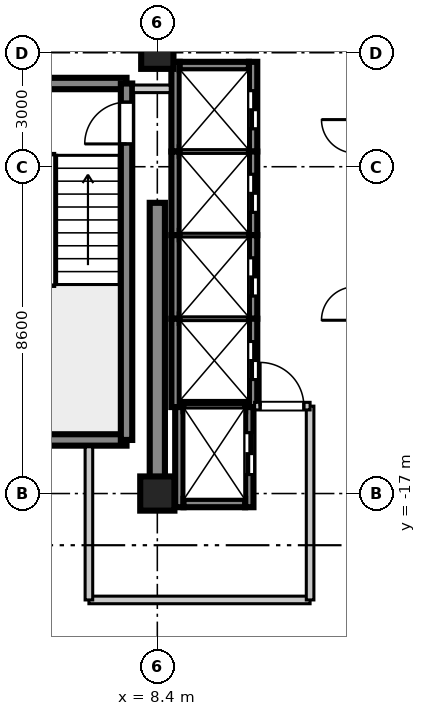
"""IFC4 building model, lengths in metres.
Left out: names, types, materials, properties, quantities, classifications, styles, units other than length and angle.
Written with IfcOpenShell. Run it as: python <this file> out.ifc"""

import sys

from ifc_helpers import new_model, si_unit, direction, frame, frame_2d, origin, origin_2d, place, context, subcontext, project, spatial, rectangle, extrude, source, transform, mapped, element, fill, save


model = new_model("IFC4")
c1 = context("Model", 3, precision=1e-05, world=origin(), true_north=direction((0.0, 1.0)))
c2 = subcontext(c1, "Body", "Model", "MODEL_VIEW")
j1 = project(units=[si_unit("LENGTHUNIT", "METRE"), si_unit("PLANEANGLEUNIT", "RADIAN")], contexts=[c1])
p1 = place(None, origin())
s1 = spatial("IfcSite", under=j1, at=p1, CompositionType="ELEMENT")
p2 = place(p1, origin())
s2 = spatial("IfcBuilding", under=s1, at=p2, CompositionType="ELEMENT")
p3 = place(p2, frame((0.0, 0.0, 281.3)))
s3 = spatial("IfcBuildingStorey", under=s2, at=p3, CompositionType="ELEMENT", Elevation=281.3)
m1 = source(origin(), c2, "Body", "SweptSolid", [
    extrude(rectangle(XDim=0.9, YDim=0.9, at=origin_2d()), origin(), (0.0, 0.0, 1.0), 3.705),
])
p4 = place(p3, frame((8.4, -17.0, 0.0), z_axis=(0.0, 0.0, 1.0), x_axis=(1.0, 0.0, 0.0)))
e1 = element("IfcColumn", 1, at=p4, inside=s3, PredefinedType="COLUMN", context=c2, shape_type="MappedRepresentation", body=[
    mapped(m1, transform((0.0, 0.0, 0.0), scale=1.0)),
])
m2 = source(origin(), c2, "Body", "SweptSolid", [
    extrude(rectangle(XDim=0.85, YDim=0.85, at=origin_2d()), origin(), (0.0, 0.0, 1.0), 3.705),
])
p5 = place(p3, frame((8.4, -5.4, 0.0), z_axis=(0.0, 0.0, 1.0), x_axis=(1.0, 0.0, 0.0)))
e2 = element("IfcColumn", 2, at=p5, inside=s3, PredefinedType="PILASTER", context=c2, shape_type="MappedRepresentation", body=[
    mapped(m2, transform((0.0, 0.0, 0.0), scale=1.0)),
])
m3 = source(origin(), c2, "Body", "SweptSolid", [
    extrude(rectangle(XDim=7.65, YDim=0.4, at=frame_2d((3.825, 0.0))), origin(), (0.0, 0.0, 1.0), 3.45),
])
p6 = place(p3, frame((8.4, -17.0, 0.0), z_axis=(0.0, 0.0, 1.0), x_axis=(0.0, 1.0, 0.0)))
e3 = element("IfcWall", 3, at=p6, inside=s3, PredefinedType="SHEAR", context=c2, shape_type="MappedRepresentation", body=[
    mapped(m3, transform((0.0, 0.0, 0.0), scale=1.0)),
])
m4 = source(origin(), c2, "Body", "SweptSolid", [
    extrude(rectangle(XDim=3.98, YDim=0.3, at=frame_2d((1.99, 0.0))), origin(), (0.0, 0.0, 1.0), 3.45),
])
for number, where, z_axis, x_axis in (
    (4, (3.61, -15.59, 0.0), (0.0, 0.0, 1.0), (1.0, 0.0, 0.0)),
    (5, (3.61, -6.21, 0.0), (0.0, 0.0, 1.0), (1.0, 0.0, 0.0)),
):
    element("IfcWall", number, at=place(p3, frame(where, z_axis=z_axis, x_axis=x_axis)), inside=s3, PredefinedType="SHEAR", context=c2, shape_type="MappedRepresentation", body=[
        mapped(m4, transform((0.0, 0.0, 0.0), scale=1.0)),
    ])
m5 = source(origin(), c2, "Body", "SweptSolid", [
    extrude(rectangle(XDim=9.38, YDim=0.3, at=frame_2d((4.69, 0.0))), origin(), (0.0, 0.0, 1.0), 3.45),
])
p7 = place(p3, frame((7.59, -15.59, 0.0), z_axis=(0.0, 0.0, 1.0), x_axis=(0.0, 1.0, 0.0)))
e6 = element("IfcWall", 6, at=p7, inside=s3, PredefinedType="SHEAR", context=c2, shape_type="MappedRepresentation", body=[
    mapped(m5, transform((0.0, 0.0, 0.0), scale=1.0)),
])
p8 = place(p7, frame((7.79, 0.0, 0.0)))
e7 = element("IfcOpeningElement", 7, at=p8, cuts=e6, PredefinedType="OPENING", context=c2, shape_type="SweptSolid", body=[
    extrude(rectangle(XDim=1.1, YDim=2.15, at=frame_2d((0.55, 1.075))), frame((0.0, 0.16, 0.0), z_axis=(0.0, -1.0, 0.0), x_axis=(1.0, 0.0, 0.0)), (0.0, 0.0, 1.0), 0.32),
])
m6 = source(origin(), c2, "Body", "SweptSolid", [
    extrude(rectangle(XDim=2.36, YDim=0.22, at=frame_2d((1.18, 0.0))), origin(), (0.0, 0.0, 1.0), 3.45),
])
p9 = place(p3, frame((8.88, -8.0, 0.0), z_axis=(0.0, 0.0, 1.0), x_axis=(0.0, 1.0, 0.0)))
e8 = element("IfcWall", 8, at=p9, inside=s3, PredefinedType="SHEAR", context=c2, shape_type="MappedRepresentation", body=[
    mapped(m6, transform((0.0, 0.0, 0.0), scale=1.0)),
])
p10 = place(p3, frame((10.92, -8.0, 0.0), z_axis=(0.0, 0.0, 1.0), x_axis=(0.0, 1.0, 0.0)))
e9 = element("IfcWall", 9, at=p10, inside=s3, PredefinedType="SHEAR", context=c2, shape_type="MappedRepresentation", body=[
    mapped(m6, transform((0.0, 0.0, 0.0), scale=1.0)),
])
p11 = place(p10, frame((0.6, 0.0, 0.0)))
e10 = element("IfcOpeningElement", 10, at=p11, cuts=e9, PredefinedType="OPENING", context=c2, shape_type="SweptSolid", body=[
    extrude(rectangle(XDim=1.0, YDim=2.2, at=frame_2d((0.5, 1.1))), frame((0.0, 0.12, 0.0), z_axis=(0.0, -1.0, 0.0), x_axis=(1.0, 0.0, 0.0)), (0.0, 0.0, 1.0), 0.24),
])
m7 = source(origin(), c2, "Body", "SweptSolid", [
    extrude(rectangle(XDim=1.82, YDim=0.22, at=frame_2d((0.91, 0.0))), origin(), (0.0, 0.0, 1.0), 3.45),
])
p12 = place(p3, frame((8.99, -5.75, 0.0), z_axis=(0.0, 0.0, 1.0), x_axis=(1.0, 0.0, 0.0)))
e11 = element("IfcWall", 11, at=p12, inside=s3, PredefinedType="SHEAR", context=c2, shape_type="MappedRepresentation", body=[
    mapped(m7, transform((0.0, 0.0, 0.0), scale=1.0)),
])
m8 = source(origin(), c2, "Body", "SweptSolid", [
    extrude(rectangle(XDim=2.2, YDim=0.22, at=frame_2d((1.1, 0.0))), origin(), (0.0, 0.0, 1.0), 3.45),
])
p13 = place(p3, frame((8.88, -10.2, 0.0), z_axis=(0.0, 0.0, 1.0), x_axis=(0.0, 1.0, 0.0)))
e12 = element("IfcWall", 12, at=p13, inside=s3, PredefinedType="SHEAR", context=c2, shape_type="MappedRepresentation", body=[
    mapped(m8, transform((0.0, 0.0, 0.0), scale=1.0)),
])
p14 = place(p3, frame((10.92, -10.2, 0.0), z_axis=(0.0, 0.0, 1.0), x_axis=(0.0, 1.0, 0.0)))
e13 = element("IfcWall", 13, at=p14, inside=s3, PredefinedType="SHEAR", context=c2, shape_type="MappedRepresentation", body=[
    mapped(m8, transform((0.0, 0.0, 0.0), scale=1.0)),
])
p15 = place(p14, frame((0.6, 0.0, 0.0)))
e14 = element("IfcOpeningElement", 14, at=p15, cuts=e13, PredefinedType="OPENING", context=c2, shape_type="SweptSolid", body=[
    extrude(rectangle(XDim=1.0, YDim=2.2, at=frame_2d((0.5, 1.1))), frame((0.0, 0.12, 0.0), z_axis=(0.0, -1.0, 0.0), x_axis=(1.0, 0.0, 0.0)), (0.0, 0.0, 1.0), 0.24),
])
m9 = source(origin(), c2, "Body", "SweptSolid", [
    extrude(rectangle(XDim=1.82, YDim=0.22, at=frame_2d((0.91, 0.0))), origin(), (0.0, 0.0, 1.0), 3.75),
])
p16 = place(p3, frame((8.99, -8.0, 0.0), z_axis=(0.0, 0.0, 1.0), x_axis=(1.0, 0.0, 0.0)))
e15 = element("IfcWall", 15, at=p16, inside=s3, PredefinedType="SHEAR", context=c2, shape_type="MappedRepresentation", body=[
    mapped(m9, transform((0.0, 0.0, 0.0), scale=1.0)),
])
p17 = place(p3, frame((8.88, -12.4, 0.0), z_axis=(0.0, 0.0, 1.0), x_axis=(0.0, 1.0, 0.0)))
e16 = element("IfcWall", 16, at=p17, inside=s3, PredefinedType="SHEAR", context=c2, shape_type="MappedRepresentation", body=[
    mapped(m8, transform((0.0, 0.0, 0.0), scale=1.0)),
])
p18 = place(p3, frame((10.92, -12.4, 0.0), z_axis=(0.0, 0.0, 1.0), x_axis=(0.0, 1.0, 0.0)))
e17 = element("IfcWall", 17, at=p18, inside=s3, PredefinedType="SHEAR", context=c2, shape_type="MappedRepresentation", body=[
    mapped(m8, transform((0.0, 0.0, 0.0), scale=1.0)),
])
p19 = place(p18, frame((0.6, 0.0, 0.0)))
e18 = element("IfcOpeningElement", 18, at=p19, cuts=e17, PredefinedType="OPENING", context=c2, shape_type="SweptSolid", body=[
    extrude(rectangle(XDim=1.0, YDim=2.2, at=frame_2d((0.5, 1.1))), frame((0.0, 0.12, 0.0), z_axis=(0.0, -1.0, 0.0), x_axis=(1.0, 0.0, 0.0)), (0.0, 0.0, 1.0), 0.24),
])
p20 = place(p3, frame((8.99, -10.2, 0.0), z_axis=(0.0, 0.0, 1.0), x_axis=(1.0, 0.0, 0.0)))
e19 = element("IfcWall", 19, at=p20, inside=s3, PredefinedType="SHEAR", context=c2, shape_type="MappedRepresentation", body=[
    mapped(m9, transform((0.0, 0.0, 0.0), scale=1.0)),
])
m10 = source(origin(), c2, "Body", "SweptSolid", [
    extrude(rectangle(XDim=2.325, YDim=0.22, at=frame_2d((1.163, 0.0))), origin(), (0.0, 0.0, 1.0), 3.45),
])
p21 = place(p3, frame((8.88, -14.725, 0.0), z_axis=(0.0, 0.0, 1.0), x_axis=(0.0, 1.0, 0.0)))
e20 = element("IfcWall", 20, at=p21, inside=s3, PredefinedType="SHEAR", context=c2, shape_type="MappedRepresentation", body=[
    mapped(m10, transform((0.0, 0.0, 0.0), scale=1.0)),
])
p22 = place(p3, frame((10.92, -14.725, 0.0), z_axis=(0.0, 0.0, 1.0), x_axis=(0.0, 1.0, 0.0)))
e21 = element("IfcWall", 21, at=p22, inside=s3, PredefinedType="SHEAR", context=c2, shape_type="MappedRepresentation", body=[
    mapped(m10, transform((0.0, 0.0, 0.0), scale=1.0)),
])
p23 = place(p22, frame((0.725, 0.0, 0.0)))
e22 = element("IfcOpeningElement", 22, at=p23, cuts=e21, PredefinedType="OPENING", context=c2, shape_type="SweptSolid", body=[
    extrude(rectangle(XDim=1.0, YDim=2.2, at=frame_2d((0.5, 1.1))), frame((0.0, 0.12, 0.0), z_axis=(0.0, -1.0, 0.0), x_axis=(1.0, 0.0, 0.0)), (0.0, 0.0, 1.0), 0.24),
])
p24 = place(p3, frame((8.99, -12.4, 0.0), z_axis=(0.0, 0.0, 1.0), x_axis=(1.0, 0.0, 0.0)))
e23 = element("IfcWall", 23, at=p24, inside=s3, PredefinedType="SHEAR", context=c2, shape_type="MappedRepresentation", body=[
    mapped(m9, transform((0.0, 0.0, 0.0), scale=1.0)),
])
m11 = source(origin(), c2, "Body", "SweptSolid", [
    extrude(rectangle(XDim=2.635, YDim=0.22, at=frame_2d((1.317, 0.0))), origin(), (0.0, 0.0, 1.0), 3.45),
])
p25 = place(p3, frame((8.98, -17.36, 0.0), z_axis=(0.0, 0.0, 1.0), x_axis=(0.0, 1.0, 0.0)))
e24 = element("IfcWall", 24, at=p25, inside=s3, PredefinedType="SHEAR", context=c2, shape_type="MappedRepresentation", body=[
    mapped(m11, transform((0.0, 0.0, 0.0), scale=1.0)),
])
p26 = place(p3, frame((10.82, -17.36, 0.0), z_axis=(0.0, 0.0, 1.0), x_axis=(0.0, 1.0, 0.0)))
e25 = element("IfcWall", 25, at=p26, inside=s3, PredefinedType="SHEAR", context=c2, shape_type="MappedRepresentation", body=[
    mapped(m11, transform((0.0, 0.0, 0.0), scale=1.0)),
])
p27 = place(p26, frame((0.86, 0.0, 0.0)))
e26 = element("IfcOpeningElement", 26, at=p27, cuts=e25, PredefinedType="OPENING", context=c2, shape_type="SweptSolid", body=[
    extrude(rectangle(XDim=1.1, YDim=2.2, at=frame_2d((0.55, 1.1))), frame((0.0, 0.12, 0.0), z_axis=(0.0, -1.0, 0.0), x_axis=(1.0, 0.0, 0.0)), (0.0, 0.0, 1.0), 0.24),
])
m12 = source(origin(), c2, "Body", "SweptSolid", [
    extrude(rectangle(XDim=1.62, YDim=0.22, at=frame_2d((0.81, 0.0))), origin(), (0.0, 0.0, 1.0), 3.45),
])
p28 = place(p3, frame((9.09, -17.25, 0.0), z_axis=(0.0, 0.0, 1.0), x_axis=(1.0, 0.0, 0.0)))
e27 = element("IfcWall", 27, at=p28, inside=s3, PredefinedType="SHEAR", context=c2, shape_type="MappedRepresentation", body=[
    mapped(m12, transform((0.0, 0.0, 0.0), scale=1.0)),
])
m13 = source(origin(), c2, "Body", "SweptSolid", [
    extrude(rectangle(XDim=1.62, YDim=0.22, at=frame_2d((0.81, 0.0))), origin(), (0.0, 0.0, 1.0), 3.75),
])
p29 = place(p3, frame((9.09, -14.725, 0.0), z_axis=(0.0, 0.0, 1.0), x_axis=(1.0, 0.0, 0.0)))
e28 = element("IfcWall", 28, at=p29, inside=s3, PredefinedType="SHEAR", context=c2, shape_type="MappedRepresentation", body=[
    mapped(m13, transform((0.0, 0.0, 0.0), scale=1.0)),
])
m14 = source(origin(), c2, "Body", "SweptSolid", [
    extrude(rectangle(XDim=5.82, YDim=0.2, at=frame_2d((2.91, 0.0))), origin(), (0.0, 0.0, 1.0), 2.79),
])
p30 = place(p3, frame((6.6, -19.8, 0.0), z_axis=(0.0, 0.0, 1.0), x_axis=(1.0, 0.0, 0.0)))
e29 = element("IfcWall", 29, at=p30, inside=s3, PredefinedType="PARTITIONING", context=c2, shape_type="MappedRepresentation", body=[
    mapped(m14, transform((0.0, 0.0, 0.0), scale=1.0)),
])
m15 = source(origin(), c2, "Body", "SweptSolid", [
    extrude(rectangle(XDim=4.03, YDim=0.2, at=frame_2d((2.015, 0.0))), origin(), (0.0, 0.0, 1.0), 2.79),
])
p31 = place(p3, frame((6.6, -19.8, 0.0), z_axis=(0.0, 0.0, 1.0), x_axis=(0.0, 1.0, 0.0)))
e30 = element("IfcWall", 30, at=p31, inside=s3, PredefinedType="PARTITIONING", context=c2, shape_type="MappedRepresentation", body=[
    mapped(m15, transform((0.0, 0.0, 0.0), scale=1.0)),
])
m16 = source(origin(), c2, "Body", "SweptSolid", [
    extrude(rectangle(XDim=5.1, YDim=0.2, at=frame_2d((2.55, 0.0))), origin(), (0.0, 0.0, 1.0), 2.79),
])
p32 = place(p3, frame((12.42, -19.8, 0.0), z_axis=(0.0, 0.0, 1.0), x_axis=(0.0, 1.0, 0.0)))
e31 = element("IfcWall", 31, at=p32, inside=s3, PredefinedType="PARTITIONING", context=c2, shape_type="MappedRepresentation", body=[
    mapped(m16, transform((0.0, 0.0, 0.0), scale=1.0)),
])
m17 = source(origin(), c2, "Body", "SweptSolid", [
    extrude(rectangle(XDim=1.46, YDim=0.2, at=frame_2d((0.73, 0.0))), origin(), (0.0, 0.0, 1.0), 2.79),
])
p33 = place(p3, frame((10.96, -14.7, 0.0), z_axis=(0.0, 0.0, 1.0), x_axis=(1.0, 0.0, 0.0)))
e32 = element("IfcWall", 32, at=p33, inside=s3, PredefinedType="PARTITIONING", context=c2, shape_type="MappedRepresentation", body=[
    mapped(m17, transform((0.0, 0.0, 0.0), scale=1.0)),
])
p34 = place(p33, frame((0.145, 0.0, 0.0)))
e33 = element("IfcOpeningElement", 33, at=p34, cuts=e32, PredefinedType="OPENING", context=c2, shape_type="SweptSolid", body=[
    extrude(rectangle(XDim=1.15, YDim=2.15, at=frame_2d((0.575, 1.075))), frame((0.0, 0.11, 0.0), z_axis=(0.0, -1.0, 0.0), x_axis=(1.0, 0.0, 0.0)), (0.0, 0.0, 1.0), 0.22),
])
m18 = source(origin(), c2, "Body", "SweptSolid", [
    extrude(rectangle(XDim=0.97, YDim=0.2, at=frame_2d((0.485, 0.0))), origin(), (0.0, 0.0, 1.0), 2.79),
])
p35 = place(p3, frame((7.77, -6.35, 0.0), z_axis=(0.0, 0.0, 1.0), x_axis=(1.0, 0.0, 0.0)))
e34 = element("IfcWall", 34, at=p35, inside=s3, PredefinedType="PARTITIONING", context=c2, shape_type="MappedRepresentation", body=[
    mapped(m18, transform((0.0, 0.0, 0.0), scale=1.0)),
])
m19 = source(origin(), c2, "Body", "SweptSolid", [
    extrude(rectangle(XDim=1.1, YDim=2.15, at=frame_2d((0.55, 1.075))), frame((0.0, 0.025, 0.0), z_axis=(0.0, -1.0, 0.0), x_axis=(1.0, 0.0, 0.0)), (0.0, 0.0, 1.0), 0.05),
])
p36 = place(p8, origin())
e35 = element("IfcDoor", 35, at=p36, inside=s3, OperationType="SINGLE_SWING_LEFT", PredefinedType="DOOR", context=c2, shape_type="MappedRepresentation", body=[
    mapped(m19, transform((0.0, 0.0, 0.0), scale=1.0)),
])
fill(e7, e35)
m20 = source(origin(), c2, "Body", "SweptSolid", [
    extrude(rectangle(XDim=1.0, YDim=2.2, at=frame_2d((0.5, 1.1))), frame((0.0, 0.025, 0.0), z_axis=(0.0, -1.0, 0.0), x_axis=(1.0, 0.0, 0.0)), (0.0, 0.0, 1.0), 0.05),
])
p37 = place(p11, frame((1.0, 0.0, 0.0), z_axis=(0.0, 0.0, 1.0), x_axis=(-1.0, 0.0, 0.0)))
e36 = element("IfcDoor", 36, at=p37, inside=s3, OperationType="DOUBLE_DOOR_SLIDING", PredefinedType="DOOR", context=c2, shape_type="MappedRepresentation", body=[
    mapped(m20, transform((0.0, 0.0, 0.0), scale=1.0)),
])
fill(e10, e36)
p38 = place(p15, frame((1.0, 0.0, 0.0), z_axis=(0.0, 0.0, 1.0), x_axis=(-1.0, 0.0, 0.0)))
e37 = element("IfcDoor", 37, at=p38, inside=s3, OperationType="DOUBLE_DOOR_SLIDING", PredefinedType="DOOR", context=c2, shape_type="MappedRepresentation", body=[
    mapped(m20, transform((0.0, 0.0, 0.0), scale=1.0)),
])
fill(e14, e37)
p39 = place(p19, frame((1.0, 0.0, 0.0), z_axis=(0.0, 0.0, 1.0), x_axis=(-1.0, 0.0, 0.0)))
e38 = element("IfcDoor", 38, at=p39, inside=s3, OperationType="DOUBLE_DOOR_SLIDING", PredefinedType="DOOR", context=c2, shape_type="MappedRepresentation", body=[
    mapped(m20, transform((0.0, 0.0, 0.0), scale=1.0)),
])
fill(e18, e38)
p40 = place(p23, frame((1.0, 0.0, 0.0), z_axis=(0.0, 0.0, 1.0), x_axis=(-1.0, 0.0, 0.0)))
e39 = element("IfcDoor", 39, at=p40, inside=s3, OperationType="DOUBLE_DOOR_SLIDING", PredefinedType="DOOR", context=c2, shape_type="MappedRepresentation", body=[
    mapped(m20, transform((0.0, 0.0, 0.0), scale=1.0)),
])
fill(e22, e39)
m21 = source(origin(), c2, "Body", "SweptSolid", [
    extrude(rectangle(XDim=1.1, YDim=2.2, at=frame_2d((0.55, 1.1))), frame((0.0, 0.025, 0.0), z_axis=(0.0, -1.0, 0.0), x_axis=(1.0, 0.0, 0.0)), (0.0, 0.0, 1.0), 0.05),
])
p41 = place(p27, frame((1.1, 0.0, 0.0), z_axis=(0.0, 0.0, 1.0), x_axis=(-1.0, 0.0, 0.0)))
e40 = element("IfcDoor", 40, at=p41, inside=s3, OperationType="DOUBLE_DOOR_SLIDING", PredefinedType="DOOR", context=c2, shape_type="MappedRepresentation", body=[
    mapped(m21, transform((0.0, 0.0, 0.0), scale=1.0)),
])
fill(e26, e40)
m22 = source(origin(), c2, "Body", "SweptSolid", [
    extrude(rectangle(XDim=1.15, YDim=2.15, at=frame_2d((0.575, 1.075))), frame((0.0, 0.025, 0.0), z_axis=(0.0, -1.0, 0.0), x_axis=(1.0, 0.0, 0.0)), (0.0, 0.0, 1.0), 0.05),
])
p42 = place(p34, origin())
e41 = element("IfcDoor", 41, at=p42, inside=s3, OperationType="SINGLE_SWING_LEFT", PredefinedType="DOOR", context=c2, shape_type="MappedRepresentation", body=[
    mapped(m22, transform((0.0, 0.0, 0.0), scale=1.0)),
])
fill(e33, e41)
save(model, sys.argv[1])
